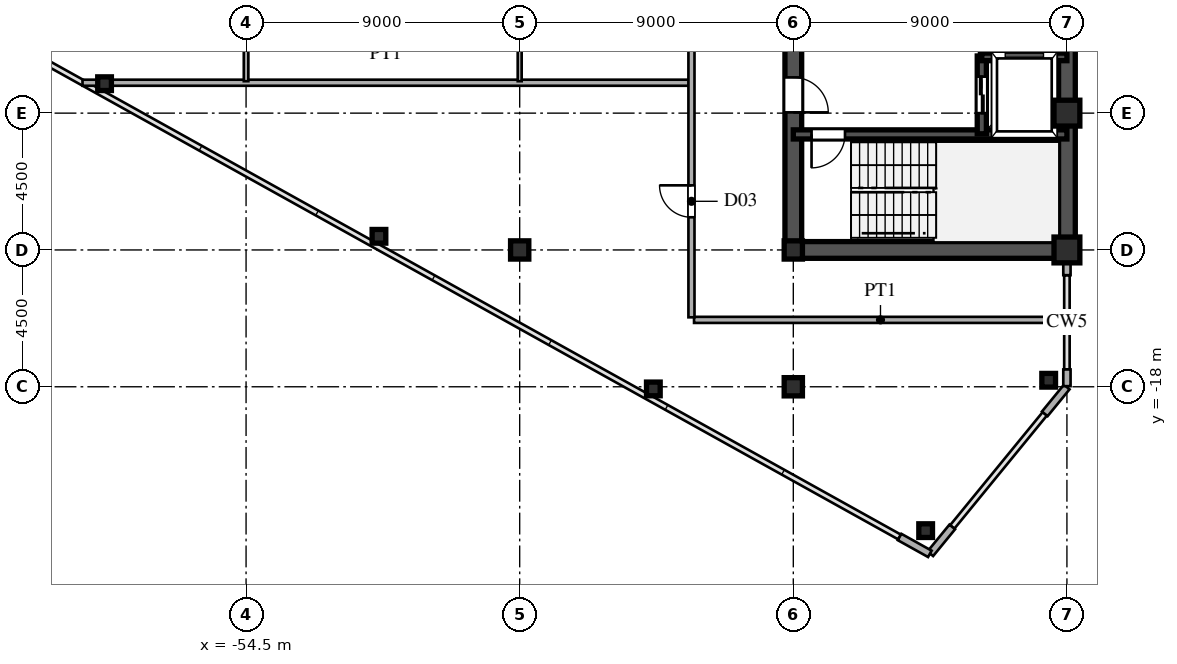
"""IFC4 building model, lengths in metres.
Left out: names, types, materials, properties, quantities, classifications, styles, units other than length and angle.
Written with IfcOpenShell. Run it as: python <this file> out.ifc"""

import sys

from ifc_helpers import new_model, si_unit, direction, frame, frame_2d, origin, origin_2d, place, context, subcontext, project, spatial, rectangle, hollow_rectangle, i_section, extrude, source, transform, mapped, element, fill, save


model = new_model("IFC4")
c1 = context("Model", 3, precision=1e-05, world=origin(), true_north=direction((0.0, 1.0)))
c2 = subcontext(c1, "Body", "Model", "MODEL_VIEW")
j1 = project(units=[si_unit("LENGTHUNIT", "METRE"), si_unit("PLANEANGLEUNIT", "RADIAN")], contexts=[c1])
p1 = place(None, origin())
s1 = spatial("IfcSite", under=j1, at=p1, CompositionType="ELEMENT")
p2 = place(p1, origin())
s2 = spatial("IfcBuilding", under=s1, at=p2, CompositionType="ELEMENT")
p3 = place(p2, frame((0.0, 0.0, 167.1)))
s3 = spatial("IfcBuildingStorey", under=s2, at=p3, CompositionType="ELEMENT", Elevation=167.1)
m1 = source(origin(), c2, "Body", "SweptSolid", [
    extrude(hollow_rectangle(XDim=0.85, YDim=0.85, WallThickness=0.036, at=origin_2d()), origin(), (0.0, 0.0, 1.0), 3.6),
])
for number, where, z_axis, x_axis in (
    (1, (-27.5, -13.5, 0.0), (0.0, 0.0, 1.0), (1.0, 0.0, 0.0)),
    (2, (-27.5, -9.0, 0.0), (0.0, 0.0, 1.0), (1.0, 0.0, 0.0)),
):
    element("IfcColumn", number, at=place(p3, frame(where, z_axis=z_axis, x_axis=x_axis)), inside=s3, PredefinedType="COLUMN", context=c2, shape_type="MappedRepresentation", body=[
        mapped(m1, transform((0.0, 0.0, 0.0), scale=1.0)),
    ])
m2 = source(origin(), c2, "Body", "SweptSolid", [
    extrude(i_section(OverallWidth=0.6, OverallDepth=0.6, WebThickness=0.025, FlangeThickness=0.04, at=origin_2d()), origin(), (0.0, 0.0, 1.0), 3.6),
])
for number, where, z_axis, x_axis in (
    (3, (-36.5, -18.0, 0.0), (0.0, 0.0, 1.0), (1.0, 0.0, 0.0)),
    (4, (-36.5, -13.5, 0.0), (0.0, 0.0, 1.0), (1.0, 0.0, 0.0)),
    (5, (-45.5, -13.5, 0.0), (0.0, 0.0, 1.0), (1.0, 0.0, 0.0)),
):
    element("IfcColumn", number, at=place(p3, frame(where, z_axis=z_axis, x_axis=x_axis)), inside=s3, PredefinedType="COLUMN", context=c2, shape_type="MappedRepresentation", body=[
        mapped(m2, transform((0.0, 0.0, 0.0), scale=1.0)),
    ])
m3 = source(origin(), c2, "Body", "SweptSolid", [
    extrude(hollow_rectangle(XDim=0.45, YDim=0.45, WallThickness=0.018, at=origin_2d()), origin(), (0.0, 0.0, 1.0), 3.6),
])
for number, where, z_axis, x_axis in (
    (6, (-28.1, -17.786, 0.0), (0.0, 0.0, 1.0), (1.0, 0.0, 0.0)),
    (7, (-32.147, -22.732, 0.0), (0.0, 0.0, 1.0), (1.0, 0.0, 0.0)),
    (8, (-41.104, -18.071, 0.0), (0.0, 0.0, 1.0), (1.0, 0.0, 0.0)),
    (9, (-50.129, -13.051, 0.0), (0.0, 0.0, 1.0), (1.0, 0.0, 0.0)),
    (10, (-59.155, -8.031, 0.0), (0.0, 0.0, 1.0), (1.0, 0.0, 0.0)),
):
    element("IfcColumn", number, at=place(p3, frame(where, z_axis=z_axis, x_axis=x_axis)), inside=s3, PredefinedType="COLUMN", context=c2, shape_type="MappedRepresentation", body=[
        mapped(m3, transform((0.0, 0.0, 0.0), scale=1.0)),
    ])
p4 = place(p3, frame((-27.5, -17.98, 0.0), z_axis=(0.0, 0.0, 1.0), x_axis=(0.0, 1.0, 0.0)))
e11 = element("IfcWall", 11, at=p4, inside=s3, PredefinedType="SOLIDWALL", context=c2, shape_type="SweptSolid", body=[
    extrude(rectangle(XDim=0.55, YDim=0.24, at=frame_2d((0.275, 0.0))), origin(), (0.0, 0.0, 1.0), 3.38),
])
p5 = place(p3, frame((-27.5, -14.33, 0.0), z_axis=(0.0, 0.0, 1.0), x_axis=(0.0, 1.0, 0.0)))
e12 = element("IfcWall", 12, at=p5, inside=s3, PredefinedType="SOLIDWALL", context=c2, shape_type="SweptSolid", body=[
    extrude(rectangle(XDim=0.55, YDim=0.24, at=frame_2d((0.275, 0.0))), origin(), (0.0, 0.0, 1.0), 2.88),
])
p6 = place(p3, frame((-33.005, -22.941, 0.0), z_axis=(0.0, 0.0, 1.0), x_axis=(0.87385402111, -0.486188389196, 0.0)))
e13 = element("IfcWall", 13, at=p6, inside=s3, PredefinedType="SOLIDWALL", context=c2, shape_type="SweptSolid", body=[
    extrude(rectangle(XDim=1.14, YDim=0.24, at=frame_2d((0.57, 0.0))), origin(), (0.0, 0.0, 1.0), 3.38),
])
for number, where, z_axis, x_axis in (
    (14, (-31.994, -23.492, 0.0), (0.0, 0.0, 1.0), (0.633, 0.774, 0.0)),
    (15, (-28.228, -18.89, 0.0), (0.0, 0.0, 1.0), (0.633, 0.774, 0.0)),
):
    element("IfcWall", number, at=place(p3, frame(where, z_axis=z_axis, x_axis=x_axis)), inside=s3, PredefinedType="SOLIDWALL", context=c2, shape_type="SweptSolid", body=[
        extrude(rectangle(XDim=1.14, YDim=0.24, at=frame_2d((0.57, 0.0))), origin(), (0.0, 0.0, 1.0), 3.38),
    ])
p7 = place(p3, frame((-27.5, -13.5, 0.0), z_axis=(0.0, 0.0, 1.0), x_axis=(0.0, 1.0, 0.0)))
e16 = element("IfcWall", 16, at=p7, inside=s3, PredefinedType="SHEAR", context=c2, shape_type="SweptSolid", body=[
    extrude(rectangle(XDim=12.2, YDim=0.55, at=frame_2d((6.1, 0.0))), origin(), (0.0, 0.0, 1.0), 3.38),
])
p8 = place(p3, frame((-36.5, -13.5, 0.0), z_axis=(0.0, 0.0, 1.0), x_axis=(1.0, 0.0, 0.0)))
e17 = element("IfcWall", 17, at=p8, inside=s3, PredefinedType="SHEAR", context=c2, shape_type="SweptSolid", body=[
    extrude(rectangle(XDim=9.0, YDim=0.55, at=frame_2d((4.5, 0.0))), origin(), (0.0, 0.0, 1.0), 3.38),
])
p9 = place(p3, frame((-36.5, -13.65, 0.0), z_axis=(0.0, 0.0, 1.0), x_axis=(0.0, 1.0, 0.0)))
e18 = element("IfcWall", 18, at=p9, inside=s3, PredefinedType="SHEAR", context=c2, shape_type="SweptSolid", body=[
    extrude(rectangle(XDim=7.15, YDim=0.55, at=frame_2d((3.575, 0.0))), origin(), (0.0, 0.0, 1.0), 3.38),
])
p10 = place(p9, frame((4.675, 0.0, 0.0)))
e19 = element("IfcOpeningElement", 19, at=p10, cuts=e18, PredefinedType="OPENING", context=c2, shape_type="SweptSolid", body=[
    extrude(rectangle(XDim=1.15, YDim=2.2, at=frame_2d((0.575, 1.1))), frame((0.0, 0.285, 0.0), z_axis=(0.0, -1.0, 0.0), x_axis=(1.0, 0.0, 0.0)), (0.0, 0.0, 1.0), 0.57),
])
p11 = place(p3, frame((-36.5, -9.7, 0.0), z_axis=(0.0, 0.0, 1.0), x_axis=(1.0, 0.0, 0.0)))
e20 = element("IfcWall", 20, at=p11, inside=s3, PredefinedType="SHEAR", context=c2, shape_type="SweptSolid", body=[
    extrude(rectangle(XDim=9.0, YDim=0.3, at=frame_2d((4.5, 0.0))), origin(), (0.0, 0.0, 1.0), 3.38),
])
p12 = place(p11, frame((0.6, 0.0, 0.0)))
e21 = element("IfcOpeningElement", 21, at=p12, cuts=e20, PredefinedType="OPENING", context=c2, shape_type="SweptSolid", body=[
    extrude(rectangle(XDim=1.1, YDim=2.2, at=frame_2d((0.55, 1.1))), frame((0.0, 0.16, 0.0), z_axis=(0.0, -1.0, 0.0), x_axis=(1.0, 0.0, 0.0)), (0.0, 0.0, 1.0), 0.32),
])
p13 = place(p3, frame((-30.3, -7.15, 0.0), z_axis=(0.0, 0.0, 1.0), x_axis=(1.0, 0.0, 0.0)))
e22 = element("IfcWall", 22, at=p13, inside=s3, PredefinedType="SHEAR", context=c2, shape_type="SweptSolid", body=[
    extrude(rectangle(XDim=2.8, YDim=0.25, at=frame_2d((1.4, 0.0))), origin(), (0.0, 0.0, 1.0), 3.38),
])
p14 = place(p3, frame((-30.3, -9.68, 0.0), z_axis=(0.0, 0.0, 1.0), x_axis=(0.0, 1.0, 0.0)))
e23 = element("IfcWall", 23, at=p14, inside=s3, PredefinedType="SHEAR", context=c2, shape_type="SweptSolid", body=[
    extrude(rectangle(XDim=2.56, YDim=0.3, at=frame_2d((1.28, 0.0))), origin(), (0.0, 0.0, 1.0), 3.38),
])
p15 = place(p14, frame((0.68, 0.0, 0.0)))
e24 = element("IfcOpeningElement", 24, at=p15, cuts=e23, PredefinedType="OPENING", context=c2, shape_type="SweptSolid", body=[
    extrude(rectangle(XDim=1.2, YDim=2.25, at=frame_2d((0.6, 1.125))), frame((0.0, 0.16, 0.0), z_axis=(0.0, -1.0, 0.0), x_axis=(1.0, 0.0, 0.0)), (0.0, 0.0, 1.0), 0.32),
])
p16 = place(p3, frame((-30.3, -7.12, 0.0), z_axis=(0.0, 0.0, 1.0), x_axis=(0.0, 1.0, 0.0)))
e25 = element("IfcWall", 25, at=p16, inside=s3, PredefinedType="PARTITIONING", context=c2, shape_type="SweptSolid", body=[
    extrude(rectangle(XDim=5.74, YDim=0.18, at=frame_2d((2.87, 0.0))), origin(), (0.0, 0.0, 1.0), 3.38),
])
p17 = place(p3, frame((-39.765, -15.8, 0.0), z_axis=(0.0, 0.0, 1.0), x_axis=(1.0, 0.0, 0.0)))
e26 = element("IfcWall", 26, at=p17, inside=s3, PredefinedType="PARTITIONING", context=c2, shape_type="SweptSolid", body=[
    extrude(rectangle(XDim=12.265, YDim=0.2, at=frame_2d((6.132, 0.0))), origin(), (0.0, 0.0, 1.0), 3.38),
])
p18 = place(p3, frame((-59.88, -8.0, 0.0), z_axis=(0.0, 0.0, 1.0), x_axis=(1.0, 0.0, 0.0)))
e27 = element("IfcWall", 27, at=p18, inside=s3, PredefinedType="PARTITIONING", context=c2, shape_type="SweptSolid", body=[
    extrude(rectangle(XDim=19.95, YDim=0.2, at=frame_2d((9.975, 0.0))), origin(), (0.0, 0.0, 1.0), 3.38),
])
p19 = place(p3, frame((-54.5, -7.95, 0.0), z_axis=(0.0, 0.0, 1.0), x_axis=(0.0, 1.0, 0.0)))
e28 = element("IfcWall", 28, at=p19, inside=s3, PredefinedType="PARTITIONING", context=c2, shape_type="SweptSolid", body=[
    extrude(rectangle(XDim=13.9, YDim=0.15, at=frame_2d((6.95, 0.0))), origin(), (0.0, 0.0, 1.0), 2.78),
])
p20 = place(p19, frame((6.475, 0.0, 0.0)))
e29 = element("IfcOpeningElement", 29, at=p20, cuts=e28, PredefinedType="OPENING", context=c2, shape_type="SweptSolid", body=[
    extrude(rectangle(XDim=0.95, YDim=2.15, at=frame_2d((0.475, 1.075))), frame((0.0, 0.085, 0.0), z_axis=(0.0, -1.0, 0.0), x_axis=(1.0, 0.0, 0.0)), (0.0, 0.0, 1.0), 0.17),
])
p21 = place(p3, frame((-45.5, -7.95, 0.0), z_axis=(0.0, 0.0, 1.0), x_axis=(0.0, 1.0, 0.0)))
e30 = element("IfcWall", 30, at=p21, inside=s3, PredefinedType="PARTITIONING", context=c2, shape_type="SweptSolid", body=[
    extrude(rectangle(XDim=9.233, YDim=0.13, at=frame_2d((4.616, 0.0))), origin(), (0.0, 0.0, 1.0), 2.78),
])
p22 = place(p21, frame((6.475, 0.0, 0.0)))
e31 = element("IfcOpeningElement", 31, at=p22, cuts=e30, PredefinedType="OPENING", context=c2, shape_type="SweptSolid", body=[
    extrude(rectangle(XDim=0.95, YDim=2.15, at=frame_2d((0.475, 1.075))), frame((0.0, 0.075, 0.0), z_axis=(0.0, -1.0, 0.0), x_axis=(1.0, 0.0, 0.0)), (0.0, 0.0, 1.0), 0.15),
])
p23 = place(p3, frame((-39.85, -15.715, 0.0), z_axis=(0.0, 0.0, 1.0), x_axis=(0.0, 1.0, 0.0)))
e32 = element("IfcWall", 32, at=p23, inside=s3, PredefinedType="PARTITIONING", context=c2, shape_type="SweptSolid", body=[
    extrude(rectangle(XDim=31.43, YDim=0.2, at=frame_2d((15.715, 0.0))), origin(), (0.0, 0.0, 1.0), 3.38),
])
p24 = place(p23, frame((3.29, 0.0, 0.0)))
e33 = element("IfcOpeningElement", 33, at=p24, cuts=e32, PredefinedType="OPENING", context=c2, shape_type="SweptSolid", body=[
    extrude(rectangle(XDim=1.05, YDim=2.25, at=frame_2d((0.525, 1.125))), frame((0.0, 0.11, 0.0), z_axis=(0.0, -1.0, 0.0), x_axis=(1.0, 0.0, 0.0)), (0.0, 0.0, 1.0), 0.22),
])
p25 = place(p23, frame((13.98, 0.0, 0.0)))
e34 = element("IfcOpeningElement", 34, at=p25, cuts=e32, PredefinedType="OPENING", context=c2, shape_type="SweptSolid", body=[
    extrude(rectangle(XDim=1.05, YDim=2.25, at=frame_2d((0.525, 1.125))), frame((0.0, 0.11, 0.0), z_axis=(0.0, -1.0, 0.0), x_axis=(1.0, 0.0, 0.0)), (0.0, 0.0, 1.0), 0.22),
])
p26 = place(p23, frame((26.09, 0.0, 0.0)))
e35 = element("IfcOpeningElement", 35, at=p26, cuts=e32, PredefinedType="OPENING", context=c2, shape_type="SweptSolid", body=[
    extrude(rectangle(XDim=1.05, YDim=2.25, at=frame_2d((0.525, 1.125))), frame((0.0, 0.11, 0.0), z_axis=(0.0, -1.0, 0.0), x_axis=(1.0, 0.0, 0.0)), (0.0, 0.0, 1.0), 0.22),
])
m4 = source(origin(), c2, "Body", "SweptSolid", [
    extrude(rectangle(XDim=1.15, YDim=2.2, at=frame_2d((0.575, 1.1))), frame((0.0, 0.025, 0.0), z_axis=(0.0, -1.0, 0.0), x_axis=(1.0, 0.0, 0.0)), (0.0, 0.0, 1.0), 0.05),
])
p27 = place(p10, frame((1.15, 0.0, 0.0), z_axis=(0.0, 0.0, 1.0), x_axis=(-1.0, 0.0, 0.0)))
e36 = element("IfcDoor", 36, at=p27, inside=s3, OperationType="SINGLE_SWING_LEFT", PredefinedType="DOOR", context=c2, shape_type="MappedRepresentation", body=[
    mapped(m4, transform((0.0, 0.0, 0.0), scale=1.0)),
])
fill(e19, e36)
m5 = source(origin(), c2, "Body", "SweptSolid", [
    extrude(rectangle(XDim=1.1, YDim=2.2, at=frame_2d((0.55, 1.1))), frame((0.0, 0.025, 0.0), z_axis=(0.0, -1.0, 0.0), x_axis=(1.0, 0.0, 0.0)), (0.0, 0.0, 1.0), 0.05),
])
p28 = place(p12, frame((1.1, 0.0, 0.0), z_axis=(0.0, 0.0, 1.0), x_axis=(-1.0, 0.0, 0.0)))
e37 = element("IfcDoor", 37, at=p28, inside=s3, OperationType="SINGLE_SWING_LEFT", PredefinedType="DOOR", context=c2, shape_type="MappedRepresentation", body=[
    mapped(m5, transform((0.0, 0.0, 0.0), scale=1.0)),
])
fill(e21, e37)
m6 = source(origin(), c2, "Body", "SweptSolid", [
    extrude(rectangle(XDim=1.2, YDim=2.25, at=frame_2d((0.6, 1.125))), frame((0.0, 0.025, 0.0), z_axis=(0.0, -1.0, 0.0), x_axis=(1.0, 0.0, 0.0)), (0.0, 0.0, 1.0), 0.05),
])
p29 = place(p15, origin())
e38 = element("IfcDoor", 38, at=p29, inside=s3, OperationType="DOUBLE_DOOR_SLIDING", PredefinedType="DOOR", context=c2, shape_type="MappedRepresentation", body=[
    mapped(m6, transform((0.0, 0.0, 0.0), scale=1.0)),
])
fill(e24, e38)
m7 = source(origin(), c2, "Body", "SweptSolid", [
    extrude(rectangle(XDim=1.05, YDim=2.25, at=frame_2d((0.525, 1.125))), frame((0.0, 0.025, 0.0), z_axis=(0.0, -1.0, 0.0), x_axis=(1.0, 0.0, 0.0)), (0.0, 0.0, 1.0), 0.05),
])
p30 = place(p24, origin())
e39 = element("IfcDoor", 39, at=p30, inside=s3, OperationType="SINGLE_SWING_RIGHT", PredefinedType="DOOR", context=c2, shape_type="MappedRepresentation", body=[
    mapped(m7, transform((0.0, 0.0, 0.0), scale=1.0)),
])
fill(e33, e39)
save(model, sys.argv[1])
